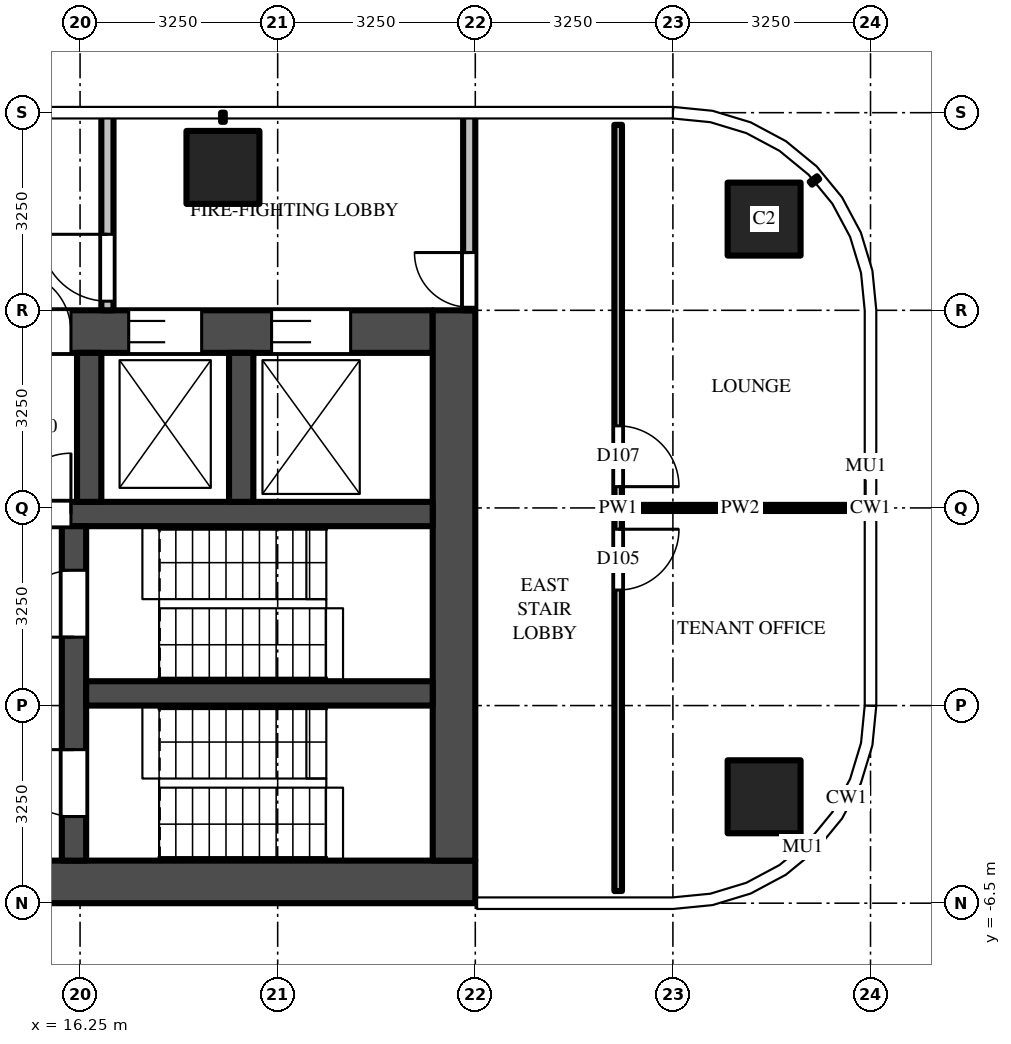
"""IFC4 building model, lengths in metres.
Left out: names, types, materials, properties, quantities, classifications, styles, units other than length and angle.
Written with IfcOpenShell. Run it as: python <this file> out.ifc"""

import sys

from ifc_helpers import new_model, si_unit, direction, frame, frame_2d, origin, origin_2d, place, context, subcontext, project, spatial, rectangle, extrude, source, transform, mapped, element, fill, save


model = new_model("IFC4")
c1 = context("Model", 3, precision=1e-05, world=origin(), true_north=direction((0.0, 1.0)))
c2 = subcontext(c1, "Body", "Model", "MODEL_VIEW")
j1 = project(units=[si_unit("LENGTHUNIT", "METRE"), si_unit("PLANEANGLEUNIT", "RADIAN")], contexts=[c1])
p1 = place(None, origin())
s1 = spatial("IfcSite", under=j1, at=p1, CompositionType="ELEMENT")
p2 = place(p1, origin())
s2 = spatial("IfcBuilding", under=s1, at=p2, CompositionType="ELEMENT")
p3 = place(p2, frame((0.0, 0.0, 185.4)))
s3 = spatial("IfcBuildingStorey", under=s2, at=p3, CompositionType="ELEMENT", Elevation=185.4)
m1 = source(origin(), c2, "Body", "SweptSolid", [
    extrude(rectangle(XDim=1.2, YDim=1.2, at=origin_2d()), origin(), (0.0, 0.0, 1.0), 3.9),
])
for number, where, z_axis, x_axis in (
    (1, (18.6, 5.6, 0.0), (0.0, 0.0, 1.0), (1.0, 0.0, 0.0)),
    (2, (27.5, 4.75, 0.0), (0.0, 0.0, 1.0), (1.0, 0.0, 0.0)),
    (3, (27.5, -4.75, 0.0), (0.0, 0.0, 1.0), (1.0, 0.0, 0.0)),
):
    element("IfcColumn", number, at=place(p3, frame(where, z_axis=z_axis, x_axis=x_axis)), inside=s3, PredefinedType="COLUMN", context=c2, shape_type="MappedRepresentation", body=[
        mapped(m1, transform((0.0, 0.0, 0.0))),
    ])
m2 = source(origin(), c2, "Body", "SweptSolid", [
    extrude(rectangle(XDim=16.55, YDim=0.7, at=frame_2d((8.275, 0.0))), origin(), (0.0, 0.0, 1.0), 3.7),
])
p4 = place(p3, frame((6.2, -6.15, 0.0), z_axis=(0.0, 0.0, 1.0), x_axis=(1.0, 0.0, 0.0)))
e4 = element("IfcWall", 4, at=p4, inside=s3, PredefinedType="SHEAR", context=c2, shape_type="MappedRepresentation", body=[
    mapped(m2, transform((0.0, 0.0, 0.0))),
])
m3 = source(origin(), c2, "Body", "SweptSolid", [
    extrude(rectangle(XDim=14.85, YDim=0.7, at=frame_2d((7.425, 0.0))), origin(), (0.0, 0.0, 1.0), 3.7),
])
p5 = place(p3, frame((7.2, 2.9, 0.0), z_axis=(0.0, 0.0, 1.0), x_axis=(1.0, 0.0, 0.0)))
e5 = element("IfcWall", 5, at=p5, inside=s3, PredefinedType="SHEAR", context=c2, shape_type="MappedRepresentation", body=[
    mapped(m3, transform((0.0, 0.0, 0.0))),
])
m4 = source(origin(), c2, "Body", "SweptSolid", [
    extrude(rectangle(XDim=1.1, YDim=2.1, at=frame_2d((0.55, 1.05))), frame((0.0, 0.36, 0.0), z_axis=(0.0, -1.0, 0.0), x_axis=(1.0, 0.0, 0.0)), (0.0, 0.0, 1.0), 0.72),
])
p6 = place(p5, frame((0.55, 0.0, 0.0)))
e6 = element("IfcOpeningElement", 6, at=p6, cuts=e5, PredefinedType="OPENING", context=c2, shape_type="MappedRepresentation", body=[
    mapped(m4, transform((0.0, 0.0, 0.0))),
])
p7 = place(p5, frame((3.15, 0.0, 0.0)))
e7 = element("IfcOpeningElement", 7, at=p7, cuts=e5, PredefinedType="OPENING", context=c2, shape_type="MappedRepresentation", body=[
    mapped(m4, transform((0.0, 0.0, 0.0))),
])
m5 = source(origin(), c2, "Body", "SweptSolid", [
    extrude(rectangle(XDim=1.2, YDim=2.1, at=frame_2d((0.6, 1.05))), frame((0.0, 0.36, 0.0), z_axis=(0.0, -1.0, 0.0), x_axis=(1.0, 0.0, 0.0)), (0.0, 0.0, 1.0), 0.72),
])
p8 = place(p5, frame((5.7, 0.0, 0.0)))
e8 = element("IfcOpeningElement", 8, at=p8, cuts=e5, PredefinedType="OPENING", context=c2, shape_type="MappedRepresentation", body=[
    mapped(m5, transform((0.0, 0.0, 0.0))),
])
m6 = source(origin(), c2, "Body", "SweptSolid", [
    extrude(rectangle(XDim=1.3, YDim=2.1, at=frame_2d((0.65, 1.05))), frame((0.0, 0.36, 0.0), z_axis=(0.0, -1.0, 0.0), x_axis=(1.0, 0.0, 0.0)), (0.0, 0.0, 1.0), 0.72),
])
p9 = place(p5, frame((12.2, 0.0, 0.0)))
e9 = element("IfcOpeningElement", 9, at=p9, cuts=e5, PredefinedType="OPENING", context=c2, shape_type="MappedRepresentation", body=[
    mapped(m6, transform((0.0, 0.0, 0.0))),
])
p10 = place(p5, frame((9.85, 0.0, 0.0)))
e10 = element("IfcOpeningElement", 10, at=p10, cuts=e5, PredefinedType="OPENING", context=c2, shape_type="MappedRepresentation", body=[
    mapped(m5, transform((0.0, 0.0, 0.0))),
])
m7 = source(origin(), c2, "Body", "SweptSolid", [
    extrude(rectangle(XDim=1.0, YDim=2.1, at=frame_2d((0.5, 1.05))), frame((0.0, 0.36, 0.0), z_axis=(0.0, -1.0, 0.0), x_axis=(1.0, 0.0, 0.0)), (0.0, 0.0, 1.0), 0.72),
])
p11 = place(p5, frame((7.9, 0.0, 0.0)))
e11 = element("IfcOpeningElement", 11, at=p11, cuts=e5, PredefinedType="OPENING", context=c2, shape_type="MappedRepresentation", body=[
    mapped(m7, transform((0.0, 0.0, 0.0))),
])
m8 = source(origin(), c2, "Body", "SweptSolid", [
    extrude(rectangle(XDim=9.05, YDim=0.7, at=frame_2d((4.525, 0.0))), origin(), (0.0, 0.0, 1.0), 3.7),
])
p12 = place(p3, frame((22.4, -5.8, 0.0), z_axis=(0.0, 0.0, 1.0), x_axis=(0.0, 1.0, 0.0)))
e12 = element("IfcWall", 12, at=p12, inside=s3, PredefinedType="SHEAR", context=c2, shape_type="MappedRepresentation", body=[
    mapped(m8, transform((0.0, 0.0, 0.0))),
])
m9 = source(origin(), c2, "Body", "SweptSolid", [
    extrude(rectangle(XDim=14.85, YDim=0.4, at=frame_2d((7.425, 0.0))), origin(), (0.0, 0.0, 1.0), 3.7),
])
p13 = place(p3, frame((7.2, -0.1, 0.0), z_axis=(0.0, 0.0, 1.0), x_axis=(1.0, 0.0, 0.0)))
e13 = element("IfcWall", 13, at=p13, inside=s3, PredefinedType="SHEAR", context=c2, shape_type="MappedRepresentation", body=[
    mapped(m9, transform((0.0, 0.0, 0.0))),
])
m10 = source(origin(), c2, "Body", "SweptSolid", [
    extrude(rectangle(XDim=1.0, YDim=2.1, at=frame_2d((0.5, 1.05))), frame((0.0, 0.21, 0.0), z_axis=(0.0, -1.0, 0.0), x_axis=(1.0, 0.0, 0.0)), (0.0, 0.0, 1.0), 0.42),
])
p14 = place(p13, frame((7.9, 0.0, 0.0)))
e14 = element("IfcOpeningElement", 14, at=p14, cuts=e13, PredefinedType="OPENING", context=c2, shape_type="MappedRepresentation", body=[
    mapped(m10, transform((0.0, 0.0, 0.0))),
])
m11 = source(origin(), c2, "Body", "SweptSolid", [
    extrude(rectangle(XDim=5.5, YDim=0.4, at=frame_2d((2.75, 0.0))), origin(), (0.0, 0.0, 1.0), 3.7),
])
p15 = place(p3, frame((16.15, -5.8, 0.0), z_axis=(0.0, 0.0, 1.0), x_axis=(0.0, 1.0, 0.0)))
e15 = element("IfcWall", 15, at=p15, inside=s3, PredefinedType="SHEAR", context=c2, shape_type="MappedRepresentation", body=[
    mapped(m11, transform((0.0, 0.0, 0.0))),
])
m12 = source(origin(), c2, "Body", "SweptSolid", [
    extrude(rectangle(XDim=1.1, YDim=2.1, at=frame_2d((0.55, 1.05))), frame((0.0, 0.21, 0.0), z_axis=(0.0, -1.0, 0.0), x_axis=(1.0, 0.0, 0.0)), (0.0, 0.0, 1.0), 0.42),
])
p16 = place(p15, frame((0.725, 0.0, 0.0)))
e16 = element("IfcOpeningElement", 16, at=p16, cuts=e15, PredefinedType="OPENING", context=c2, shape_type="MappedRepresentation", body=[
    mapped(m12, transform((0.0, 0.0, 0.0))),
])
p17 = place(p15, frame((3.675, 0.0, 0.0)))
e17 = element("IfcOpeningElement", 17, at=p17, cuts=e15, PredefinedType="OPENING", context=c2, shape_type="MappedRepresentation", body=[
    mapped(m12, transform((0.0, 0.0, 0.0))),
])
m13 = source(origin(), c2, "Body", "SweptSolid", [
    extrude(rectangle(XDim=5.7, YDim=0.4, at=frame_2d((2.85, 0.0))), origin(), (0.0, 0.0, 1.0), 3.7),
])
p18 = place(p3, frame((16.35, -3.05, 0.0), z_axis=(0.0, 0.0, 1.0), x_axis=(1.0, 0.0, 0.0)))
e18 = element("IfcWall", 18, at=p18, inside=s3, PredefinedType="SHEAR", context=c2, shape_type="MappedRepresentation", body=[
    mapped(m13, transform((0.0, 0.0, 0.0))),
])
m14 = source(origin(), c2, "Body", "SweptSolid", [
    extrude(rectangle(XDim=2.45, YDim=0.4, at=frame_2d((1.225, 0.0))), origin(), (0.0, 0.0, 1.0), 3.7),
])
for number, where, z_axis, x_axis in (
    (19, (16.4, 0.1, 0.0), (0.0, 0.0, 1.0), (0.0, 1.0, 0.0)),
    (20, (18.9, 0.1, 0.0), (0.0, 0.0, 1.0), (0.0, 1.0, 0.0)),
):
    element("IfcWall", number, at=place(p3, frame(where, z_axis=z_axis, x_axis=x_axis)), inside=s3, PredefinedType="SHEAR", context=c2, shape_type="MappedRepresentation", body=[
        mapped(m14, transform((0.0, 0.0, 0.0))),
    ])
m15 = source(origin(), c2, "Body", "SweptSolid", [
    extrude(rectangle(XDim=3.25, YDim=0.2, at=frame_2d((1.625, 0.0))), origin(), (0.0, 0.0, 1.0), 3.7),
])
p19 = place(p3, frame((16.7, 3.25, 0.0), z_axis=(0.0, 0.0, 1.0), x_axis=(0.0, 1.0, 0.0)))
e21 = element("IfcWall", 21, at=p19, inside=s3, PredefinedType="PARTITIONING", context=c2, shape_type="MappedRepresentation", body=[
    mapped(m15, transform((0.0, 0.0, 0.0))),
])
m16 = source(origin(), c2, "Body", "SweptSolid", [
    extrude(rectangle(XDim=1.1, YDim=2.1, at=frame_2d((0.55, 1.05))), frame((0.0, 0.11, 0.0), z_axis=(0.0, -1.0, 0.0), x_axis=(1.0, 0.0, 0.0)), (0.0, 0.0, 1.0), 0.22),
])
p20 = place(p19, frame((0.15, 0.0, 0.0)))
e22 = element("IfcOpeningElement", 22, at=p20, cuts=e21, PredefinedType="OPENING", context=c2, shape_type="MappedRepresentation", body=[
    mapped(m16, transform((0.0, 0.0, 0.0))),
])
p21 = place(p3, frame((22.65, 3.25, 0.0), z_axis=(0.0, 0.0, 1.0), x_axis=(0.0, 1.0, 0.0)))
e23 = element("IfcWall", 23, at=p21, inside=s3, PredefinedType="PARTITIONING", context=c2, shape_type="MappedRepresentation", body=[
    mapped(m15, transform((0.0, 0.0, 0.0))),
])
m17 = source(origin(), c2, "Body", "SweptSolid", [
    extrude(rectangle(XDim=0.9, YDim=2.1, at=frame_2d((0.45, 1.05))), frame((0.0, 0.11, 0.0), z_axis=(0.0, -1.0, 0.0), x_axis=(1.0, 0.0, 0.0)), (0.0, 0.0, 1.0), 0.22),
])
p22 = place(p21, frame((0.05, 0.0, 0.0)))
e24 = element("IfcOpeningElement", 24, at=p22, cuts=e23, PredefinedType="OPENING", context=c2, shape_type="MappedRepresentation", body=[
    mapped(m17, transform((0.0, 0.0, 0.0))),
])
m18 = source(origin(), c2, "Body", "SweptSolid", [
    extrude(rectangle(XDim=12.6, YDim=0.125, at=frame_2d((6.3, 0.0))), origin(), (0.0, 0.0, 1.0), 2.78),
])
p23 = place(p3, frame((25.1, 6.3, 0.0), z_axis=(0.0, 0.0, 1.0), x_axis=(0.0, -1.0, 0.0)))
e25 = element("IfcWall", 25, at=p23, inside=s3, PredefinedType="PARTITIONING", context=c2, shape_type="MappedRepresentation", body=[
    mapped(m18, transform((0.0, 0.0, 0.0))),
])
m19 = source(origin(), c2, "Body", "SweptSolid", [
    extrude(rectangle(XDim=1.0, YDim=2.1, at=frame_2d((0.5, 1.05))), frame((0.0, 0.073, 0.0), z_axis=(0.0, -1.0, 0.0), x_axis=(1.0, 0.0, 0.0)), (0.0, 0.0, 1.0), 0.145),
])
p24 = place(p23, frame((6.65, 0.0, 0.0)))
e26 = element("IfcOpeningElement", 26, at=p24, cuts=e25, PredefinedType="OPENING", context=c2, shape_type="MappedRepresentation", body=[
    mapped(m19, transform((0.0, 0.0, 0.0))),
])
p25 = place(p23, frame((4.95, 0.0, 0.0)))
e27 = element("IfcOpeningElement", 27, at=p25, cuts=e25, PredefinedType="OPENING", context=c2, shape_type="MappedRepresentation", body=[
    mapped(m19, transform((0.0, 0.0, 0.0))),
])
m20 = source(origin(), c2, "Body", "SweptSolid", [
    extrude(rectangle(XDim=3.887, YDim=0.1, at=frame_2d((1.944, 0.0))), origin(), (0.0, 0.0, 1.0), 2.78),
])
p26 = place(p3, frame((25.163, 0.0, 0.0), z_axis=(0.0, 0.0, 1.0), x_axis=(1.0, 0.0, 0.0)))
e28 = element("IfcWall", 28, at=p26, inside=s3, PredefinedType="PARTITIONING", context=c2, shape_type="MappedRepresentation", body=[
    mapped(m20, transform((0.0, 0.0, 0.0))),
])
m21 = source(origin(), c2, "Body", "SweptSolid", [
    extrude(rectangle(XDim=1.3, YDim=2.1, at=frame_2d((0.65, 1.05))), frame((0.0, -0.275, 0.0), z_axis=(0.0, -1.0, 0.0), x_axis=(1.0, 0.0, 0.0)), (0.0, 0.0, 1.0), 0.05),
])
p27 = place(p9, origin())
e29 = element("IfcDoor", 29, at=p27, inside=s3, OperationType="DOUBLE_DOOR_SLIDING", PredefinedType="DOOR", context=c2, shape_type="MappedRepresentation", body=[
    mapped(m21, transform((0.0, 0.0, 0.0))),
])
fill(e9, e29)
m22 = source(origin(), c2, "Body", "SweptSolid", [
    extrude(rectangle(XDim=1.2, YDim=2.1, at=frame_2d((0.6, 1.05))), frame((0.0, -0.275, 0.0), z_axis=(0.0, -1.0, 0.0), x_axis=(1.0, 0.0, 0.0)), (0.0, 0.0, 1.0), 0.05),
])
p28 = place(p10, origin())
e30 = element("IfcDoor", 30, at=p28, inside=s3, OperationType="DOUBLE_DOOR_SLIDING", PredefinedType="DOOR", context=c2, shape_type="MappedRepresentation", body=[
    mapped(m22, transform((0.0, 0.0, 0.0))),
])
fill(e10, e30)
m23 = source(origin(), c2, "Body", "SweptSolid", [
    extrude(rectangle(XDim=1.1, YDim=2.1, at=frame_2d((0.55, 1.05))), frame((0.0, 0.025, 0.0), z_axis=(0.0, -1.0, 0.0), x_axis=(1.0, 0.0, 0.0)), (0.0, 0.0, 1.0), 0.05),
])
p29 = place(p16, origin())
e31 = element("IfcDoor", 31, at=p29, inside=s3, OperationType="SINGLE_SWING_RIGHT", PredefinedType="DOOR", context=c2, shape_type="MappedRepresentation", body=[
    mapped(m23, transform((0.0, 0.0, 0.0))),
])
fill(e16, e31)
p30 = place(p17, origin())
e32 = element("IfcDoor", 32, at=p30, inside=s3, OperationType="SINGLE_SWING_LEFT", PredefinedType="DOOR", context=c2, shape_type="MappedRepresentation", body=[
    mapped(m23, transform((0.0, 0.0, 0.0))),
])
fill(e17, e32)
m24 = source(origin(), c2, "Body", "SweptSolid", [
    extrude(rectangle(XDim=1.0, YDim=2.1, at=frame_2d((0.5, 1.05))), frame((0.0, 0.025, 0.0), z_axis=(0.0, -1.0, 0.0), x_axis=(1.0, 0.0, 0.0)), (0.0, 0.0, 1.0), 0.05),
])
p31 = place(p14, origin())
e33 = element("IfcDoor", 33, at=p31, inside=s3, OperationType="SINGLE_SWING_RIGHT", PredefinedType="DOOR", context=c2, shape_type="MappedRepresentation", body=[
    mapped(m24, transform((0.0, 0.0, 0.0))),
])
fill(e14, e33)
m25 = source(origin(), c2, "Body", "SweptSolid", [
    extrude(rectangle(XDim=1.0, YDim=2.1, at=frame_2d((0.5, 1.05))), frame((0.0, -0.275, 0.0), z_axis=(0.0, -1.0, 0.0), x_axis=(1.0, 0.0, 0.0)), (0.0, 0.0, 1.0), 0.05),
])
p32 = place(p11, origin())
e34 = element("IfcDoor", 34, at=p32, inside=s3, OperationType="SINGLE_SWING_LEFT", PredefinedType="DOOR", context=c2, shape_type="MappedRepresentation", body=[
    mapped(m25, transform((0.0, 0.0, 0.0))),
])
fill(e11, e34)
p33 = place(p20, origin())
e35 = element("IfcDoor", 35, at=p33, inside=s3, OperationType="SINGLE_SWING_RIGHT", PredefinedType="DOOR", context=c2, shape_type="MappedRepresentation", body=[
    mapped(m23, transform((0.0, 0.0, 0.0))),
])
fill(e22, e35)
m26 = source(origin(), c2, "Body", "SweptSolid", [
    extrude(rectangle(XDim=0.9, YDim=2.1, at=frame_2d((0.45, 1.05))), frame((0.0, 0.025, 0.0), z_axis=(0.0, -1.0, 0.0), x_axis=(1.0, 0.0, 0.0)), (0.0, 0.0, 1.0), 0.05),
])
p34 = place(p22, origin())
e36 = element("IfcDoor", 36, at=p34, inside=s3, OperationType="SINGLE_SWING_RIGHT", PredefinedType="DOOR", context=c2, shape_type="MappedRepresentation", body=[
    mapped(m26, transform((0.0, 0.0, 0.0))),
])
fill(e24, e36)
p35 = place(p24, origin())
e37 = element("IfcDoor", 37, at=p35, inside=s3, OperationType="SINGLE_SWING_LEFT", PredefinedType="DOOR", context=c2, shape_type="MappedRepresentation", body=[
    mapped(m24, transform((0.0, 0.0, 0.0))),
])
fill(e26, e37)
p36 = place(p25, origin())
e38 = element("IfcDoor", 38, at=p36, inside=s3, OperationType="SINGLE_SWING_RIGHT", PredefinedType="DOOR", context=c2, shape_type="MappedRepresentation", body=[
    mapped(m24, transform((0.0, 0.0, 0.0))),
])
fill(e27, e38)
save(model, sys.argv[1])
